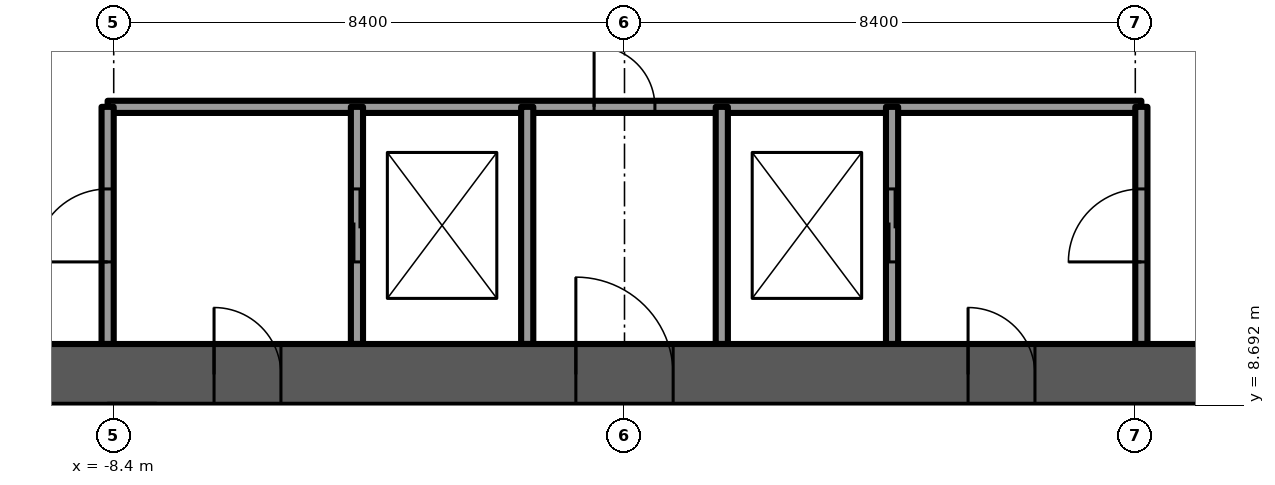
"""IFC4 building model, lengths in metres.
Left out: names, types, materials, properties, quantities, classifications, styles, units other than length and angle.
Written with IfcOpenShell. Run it as: python <this file> out.ifc"""

import sys

from ifc_helpers import new_model, si_unit, direction, frame, frame_2d, origin, place, context, subcontext, project, spatial, rectangle, extrude, element, fill, save


model = new_model("IFC4")
c1 = context("Model", 3, precision=1e-05, world=origin(), true_north=direction((0.0, 1.0)))
c2 = subcontext(c1, "Body", "Model", "MODEL_VIEW")
j1 = project(units=[si_unit("LENGTHUNIT", "METRE"), si_unit("PLANEANGLEUNIT", "RADIAN")], contexts=[c1])
p1 = place(None, origin())
s1 = spatial("IfcSite", under=j1, at=p1, CompositionType="ELEMENT")
p2 = place(p1, origin())
s2 = spatial("IfcBuilding", under=s1, at=p2, CompositionType="ELEMENT")
p3 = place(p2, frame((0.0, 0.0, 131.0)))
s3 = spatial("IfcBuildingStorey", under=s2, at=p3, CompositionType="ELEMENT", Elevation=131.0)
p4 = place(p3, frame((-12.0, 9.2, -0.3), z_axis=(0.0, 0.0, 1.0), x_axis=(1.0, 0.0, 0.0)))
e1 = element("IfcWall", 1, at=p4, inside=s3, PredefinedType="SHEAR", context=c2, shape_type="SweptSolid", body=[
    extrude(rectangle(XDim=24.0, YDim=1.0, at=frame_2d((12.0, 0.0))), origin(), (0.0, 0.0, 1.0), 3.75),
])
p5 = place(p4, frame((11.2, 0.0, 0.0)))
e2 = element("IfcOpeningElement", 2, at=p5, cuts=e1, PredefinedType="OPENING", context=c2, shape_type="SweptSolid", body=[
    extrude(rectangle(XDim=1.6, YDim=2.1, at=frame_2d((0.8, 1.05))), frame((0.0, 0.5, 0.0), z_axis=(0.0, -1.0, 0.0), x_axis=(1.0, 0.0, 0.0)), (0.0, 0.0, 1.0), 1.0),
])
p6 = place(p4, frame((5.25, 0.0, 0.0)))
e3 = element("IfcOpeningElement", 3, at=p6, cuts=e1, PredefinedType="OPENING", context=c2, shape_type="SweptSolid", body=[
    extrude(rectangle(XDim=1.1, YDim=2.1, at=frame_2d((0.55, 1.05))), frame((0.0, 0.5, 0.0), z_axis=(0.0, -1.0, 0.0), x_axis=(1.0, 0.0, 0.0)), (0.0, 0.0, 1.0), 1.0),
])
p7 = place(p4, frame((17.65, 0.0, 0.0)))
e4 = element("IfcOpeningElement", 4, at=p7, cuts=e1, PredefinedType="OPENING", context=c2, shape_type="SweptSolid", body=[
    extrude(rectangle(XDim=1.1, YDim=2.1, at=frame_2d((0.55, 1.05))), frame((0.0, 0.5, 0.0), z_axis=(0.0, -1.0, 0.0), x_axis=(1.0, 0.0, 0.0)), (0.0, 0.0, 1.0), 1.0),
])
p8 = place(p3, frame((-8.5, 13.6, 0.0), z_axis=(0.0, 0.0, 1.0), x_axis=(1.0, 0.0, 0.0)))
e5 = element("IfcWall", 5, at=p8, inside=s3, PredefinedType="PARTITIONING", context=c2, shape_type="SweptSolid", body=[
    extrude(rectangle(XDim=17.0, YDim=0.2, at=frame_2d((8.5, 0.0))), origin(), (0.0, 0.0, 1.0), 3.45),
])
p9 = place(p8, frame((8.0, 0.0, 0.0)))
e6 = element("IfcOpeningElement", 6, at=p9, cuts=e5, PredefinedType="OPENING", context=c2, shape_type="SweptSolid", body=[
    extrude(rectangle(XDim=1.0, YDim=2.1, at=frame_2d((0.5, 1.05))), frame((0.0, 0.1, 0.0), z_axis=(0.0, -1.0, 0.0), x_axis=(1.0, 0.0, 0.0)), (0.0, 0.0, 1.0), 0.2),
])
p10 = place(p3, frame((-8.5, 9.7, 0.0), z_axis=(0.0, 0.0, 1.0), x_axis=(0.0, 1.0, 0.0)))
e7 = element("IfcWall", 7, at=p10, inside=s3, PredefinedType="PARTITIONING", context=c2, shape_type="SweptSolid", body=[
    extrude(rectangle(XDim=3.9, YDim=0.2, at=frame_2d((1.95, 0.0))), origin(), (0.0, 0.0, 1.0), 3.45),
])
p11 = place(p10, frame((1.35, 0.0, 0.0)))
e8 = element("IfcOpeningElement", 8, at=p11, cuts=e7, PredefinedType="OPENING", context=c2, shape_type="SweptSolid", body=[
    extrude(rectangle(XDim=1.2, YDim=2.1, at=frame_2d((0.6, 1.05))), frame((0.0, 0.1, 0.0), z_axis=(0.0, -1.0, 0.0), x_axis=(1.0, 0.0, 0.0)), (0.0, 0.0, 1.0), 0.2),
])
p12 = place(p3, frame((8.5, 9.7, 0.0), z_axis=(0.0, 0.0, 1.0), x_axis=(0.0, 1.0, 0.0)))
e9 = element("IfcWall", 9, at=p12, inside=s3, PredefinedType="PARTITIONING", context=c2, shape_type="SweptSolid", body=[
    extrude(rectangle(XDim=3.9, YDim=0.2, at=frame_2d((1.95, 0.0))), origin(), (0.0, 0.0, 1.0), 3.45),
])
p13 = place(p12, frame((1.35, 0.0, 0.0)))
e10 = element("IfcOpeningElement", 10, at=p13, cuts=e9, PredefinedType="OPENING", context=c2, shape_type="SweptSolid", body=[
    extrude(rectangle(XDim=1.2, YDim=2.1, at=frame_2d((0.6, 1.05))), frame((0.0, 0.1, 0.0), z_axis=(0.0, -1.0, 0.0), x_axis=(1.0, 0.0, 0.0)), (0.0, 0.0, 1.0), 0.2),
])
p14 = place(p3, frame((-4.4, 9.7, 0.0), z_axis=(0.0, 0.0, 1.0), x_axis=(0.0, 1.0, 0.0)))
e11 = element("IfcWall", 11, at=p14, inside=s3, PredefinedType="PARTITIONING", context=c2, shape_type="SweptSolid", body=[
    extrude(rectangle(XDim=3.9, YDim=0.2, at=frame_2d((1.95, 0.0))), origin(), (0.0, 0.0, 1.0), 3.45),
])
p15 = place(p14, frame((1.35, 0.0, 0.0)))
e12 = element("IfcOpeningElement", 12, at=p15, cuts=e11, PredefinedType="OPENING", context=c2, shape_type="SweptSolid", body=[
    extrude(rectangle(XDim=1.2, YDim=2.1, at=frame_2d((0.6, 1.05))), frame((0.0, 0.1, 0.0), z_axis=(0.0, -1.0, 0.0), x_axis=(1.0, 0.0, 0.0)), (0.0, 0.0, 1.0), 0.2),
])
p16 = place(p3, frame((4.4, 9.7, 0.0), z_axis=(0.0, 0.0, 1.0), x_axis=(0.0, 1.0, 0.0)))
e13 = element("IfcWall", 13, at=p16, inside=s3, PredefinedType="PARTITIONING", context=c2, shape_type="SweptSolid", body=[
    extrude(rectangle(XDim=3.9, YDim=0.2, at=frame_2d((1.95, 0.0))), origin(), (0.0, 0.0, 1.0), 3.45),
])
p17 = place(p16, frame((1.35, 0.0, 0.0)))
e14 = element("IfcOpeningElement", 14, at=p17, cuts=e13, PredefinedType="OPENING", context=c2, shape_type="SweptSolid", body=[
    extrude(rectangle(XDim=1.2, YDim=2.1, at=frame_2d((0.6, 1.05))), frame((0.0, 0.1, 0.0), z_axis=(0.0, -1.0, 0.0), x_axis=(1.0, 0.0, 0.0)), (0.0, 0.0, 1.0), 0.2),
])
for number, where, z_axis, x_axis in (
    (15, (-1.6, 9.7, 0.0), (0.0, 0.0, 1.0), (0.0, 1.0, 0.0)),
    (16, (1.6, 9.7, 0.0), (0.0, 0.0, 1.0), (0.0, 1.0, 0.0)),
):
    element("IfcWall", number, at=place(p3, frame(where, z_axis=z_axis, x_axis=x_axis)), inside=s3, PredefinedType="PARTITIONING", context=c2, shape_type="SweptSolid", body=[
        extrude(rectangle(XDim=3.9, YDim=0.2, at=frame_2d((1.95, 0.0))), origin(), (0.0, 0.0, 1.0), 3.45),
    ])
p18 = place(p5, origin())
e17 = element("IfcDoor", 17, at=p18, inside=s3, OperationType="DOUBLE_DOOR_SINGLE_SWING", PredefinedType="DOOR", context=c2, shape_type="SweptSolid", body=[
    extrude(rectangle(XDim=1.6, YDim=2.1, at=frame_2d((0.8, 1.05))), frame((0.0, 0.025, 0.0), z_axis=(0.0, -1.0, 0.0), x_axis=(1.0, 0.0, 0.0)), (0.0, 0.0, 1.0), 0.05),
])
fill(e2, e17)
p19 = place(p6, origin())
e18 = element("IfcDoor", 18, at=p19, inside=s3, OperationType="SINGLE_SWING_LEFT", PredefinedType="DOOR", context=c2, shape_type="SweptSolid", body=[
    extrude(rectangle(XDim=1.1, YDim=2.1, at=frame_2d((0.55, 1.05))), frame((0.0, 0.025, 0.0), z_axis=(0.0, -1.0, 0.0), x_axis=(1.0, 0.0, 0.0)), (0.0, 0.0, 1.0), 0.05),
])
fill(e3, e18)
p20 = place(p7, origin())
e19 = element("IfcDoor", 19, at=p20, inside=s3, OperationType="SINGLE_SWING_RIGHT", PredefinedType="DOOR", context=c2, shape_type="SweptSolid", body=[
    extrude(rectangle(XDim=1.1, YDim=2.1, at=frame_2d((0.55, 1.05))), frame((0.0, 0.025, 0.0), z_axis=(0.0, -1.0, 0.0), x_axis=(1.0, 0.0, 0.0)), (0.0, 0.0, 1.0), 0.05),
])
fill(e4, e19)
p21 = place(p15, origin())
e20 = element("IfcDoor", 20, at=p21, inside=s3, OperationType="SLIDING_TO_LEFT", PredefinedType="DOOR", context=c2, shape_type="SweptSolid", body=[
    extrude(rectangle(XDim=1.2, YDim=2.1, at=frame_2d((0.6, 1.05))), frame((0.0, 0.025, 0.0), z_axis=(0.0, -1.0, 0.0), x_axis=(1.0, 0.0, 0.0)), (0.0, 0.0, 1.0), 0.05),
])
fill(e12, e20)
p22 = place(p11, origin())
e21 = element("IfcDoor", 21, at=p22, inside=s3, OperationType="SINGLE_SWING_LEFT", PredefinedType="DOOR", context=c2, shape_type="SweptSolid", body=[
    extrude(rectangle(XDim=1.2, YDim=2.1, at=frame_2d((0.6, 1.05))), frame((0.0, 0.025, 0.0), z_axis=(0.0, -1.0, 0.0), x_axis=(1.0, 0.0, 0.0)), (0.0, 0.0, 1.0), 0.05),
])
fill(e8, e21)
p23 = place(p17, origin())
e22 = element("IfcDoor", 22, at=p23, inside=s3, OperationType="SLIDING_TO_LEFT", PredefinedType="DOOR", context=c2, shape_type="SweptSolid", body=[
    extrude(rectangle(XDim=1.2, YDim=2.1, at=frame_2d((0.6, 1.05))), frame((0.0, 0.025, 0.0), z_axis=(0.0, -1.0, 0.0), x_axis=(1.0, 0.0, 0.0)), (0.0, 0.0, 1.0), 0.05),
])
fill(e14, e22)
p24 = place(p13, origin())
e23 = element("IfcDoor", 23, at=p24, inside=s3, OperationType="SINGLE_SWING_LEFT", PredefinedType="DOOR", context=c2, shape_type="SweptSolid", body=[
    extrude(rectangle(XDim=1.2, YDim=2.1, at=frame_2d((0.6, 1.05))), frame((0.0, 0.025, 0.0), z_axis=(0.0, -1.0, 0.0), x_axis=(1.0, 0.0, 0.0)), (0.0, 0.0, 1.0), 0.05),
])
fill(e10, e23)
p25 = place(p9, origin())
e24 = element("IfcDoor", 24, at=p25, inside=s3, OperationType="SINGLE_SWING_LEFT", PredefinedType="DOOR", context=c2, shape_type="SweptSolid", body=[
    extrude(rectangle(XDim=1.0, YDim=2.1, at=frame_2d((0.5, 1.05))), frame((0.0, 0.025, 0.0), z_axis=(0.0, -1.0, 0.0), x_axis=(1.0, 0.0, 0.0)), (0.0, 0.0, 1.0), 0.05),
])
fill(e6, e24)
save(model, sys.argv[1])
